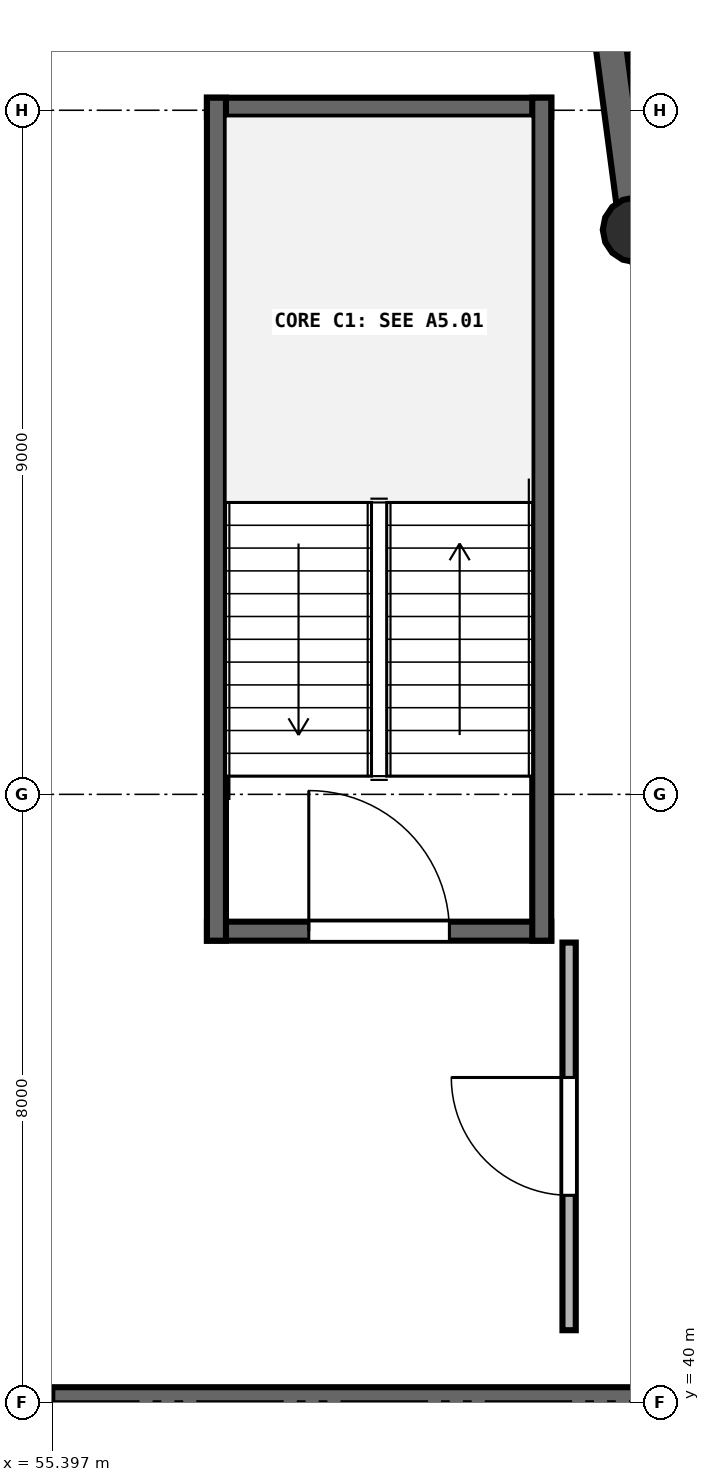
"""IFC4 building model, lengths in metres.
Left out: names, types, materials, properties, quantities, classifications, styles, units other than length and angle.
Written with IfcOpenShell. Run it as: python <this file> out.ifc"""

import sys

from ifc_helpers import new_model, si_unit, direction, frame, frame_2d, origin, origin_2d, place, context, subcontext, project, spatial, rectangle, circle, extrude, element, fill, save


model = new_model("IFC4")
c1 = context("Model", 3, precision=1e-05, world=origin(), true_north=direction((0.0, 1.0)))
c2 = subcontext(c1, "Body", "Model", "MODEL_VIEW")
j1 = project(units=[si_unit("LENGTHUNIT", "METRE"), si_unit("PLANEANGLEUNIT", "RADIAN")], contexts=[c1])
p1 = place(None, origin())
s1 = spatial("IfcSite", under=j1, at=p1, CompositionType="ELEMENT")
p2 = place(p1, origin())
s2 = spatial("IfcBuilding", under=s1, at=p2, CompositionType="ELEMENT")
p3 = place(p2, frame((0.0, 0.0, 19.2)))
s3 = spatial("IfcBuildingStorey", under=s2, at=p3, CompositionType="ELEMENT", Elevation=19.2)
p4 = place(p3, frame((63.068, 55.427, 0.0), z_axis=(0.0, 0.0, 1.0), x_axis=(1.0, 0.0, 0.0)))
e1 = element("IfcColumn", 1, at=p4, inside=s3, PredefinedType="COLUMN", context=c2, shape_type="SweptSolid", body=[
    extrude(circle(Radius=0.425, at=origin_2d()), origin(), (0.0, 0.0, 1.0), 4.25),
])
p5 = place(p3, frame((62.4, 60.5, 0.0), z_axis=(0.0, 0.0, 1.0), x_axis=(0.130591512704, -0.99143625958, 0.0)))
e2 = element("IfcWall", 2, at=p5, inside=s3, PredefinedType="SHEAR", context=c2, shape_type="SweptSolid", body=[
    extrude(rectangle(XDim=5.117, YDim=0.4, at=frame_2d((2.558, 0.0))), origin(), (0.0, 0.0, 1.0), 4.25),
])
p6 = place(p3, frame((63.068, 55.427, 0.0), z_axis=(0.0, 0.0, 1.0), x_axis=(0.382642581018, -0.923896452635, 0.0)))
e3 = element("IfcWall", 3, at=p6, inside=s3, PredefinedType="SHEAR", context=c2, shape_type="SweptSolid", body=[
    extrude(rectangle(XDim=5.116, YDim=0.4, at=frame_2d((2.558, 0.0))), origin(), (0.0, 0.0, 1.0), 4.25),
])
p7 = place(p3, frame((55.4, 40.0, 0.0), z_axis=(0.0, 0.0, 1.0), x_axis=(1.0, 0.0, 0.0)))
e4 = element("IfcWall", 4, at=p7, inside=s3, PredefinedType="SHEAR", context=c2, shape_type="SweptSolid", body=[
    extrude(rectangle(XDim=8.2, YDim=0.4, at=frame_2d((4.1, 0.0))), origin(), (0.0, 0.0, 1.0), 4.25),
])
p8 = place(p3, frame((57.435, 46.2, 0.0), z_axis=(0.0, 0.0, 1.0), x_axis=(1.0, 0.0, 0.0)))
e5 = element("IfcWall", 5, at=p8, inside=s3, PredefinedType="SHEAR", context=c2, shape_type="SweptSolid", body=[
    extrude(rectangle(XDim=4.53, YDim=0.25, at=frame_2d((2.265, 0.0))), origin(), (0.0, 0.0, 1.0), 4.25),
])
p9 = place(p8, frame((1.34, 0.0, 0.0)))
e6 = element("IfcOpeningElement", 6, at=p9, cuts=e5, PredefinedType="OPENING", context=c2, shape_type="SweptSolid", body=[
    extrude(rectangle(XDim=1.85, YDim=2.25, at=frame_2d((0.925, 1.125))), frame((0.0, 0.135, 0.0), z_axis=(0.0, -1.0, 0.0), x_axis=(1.0, 0.0, 0.0)), (0.0, 0.0, 1.0), 0.27),
])
p10 = place(p3, frame((57.435, 57.04, 0.0), z_axis=(0.0, 0.0, 1.0), x_axis=(1.0, 0.0, 0.0)))
e7 = element("IfcWall", 7, at=p10, inside=s3, PredefinedType="SHEAR", context=c2, shape_type="SweptSolid", body=[
    extrude(rectangle(XDim=4.53, YDim=0.25, at=frame_2d((2.265, 0.0))), origin(), (0.0, 0.0, 1.0), 4.25),
])
for number, where, z_axis, x_axis in (
    (8, (57.56, 46.075, 0.0), (0.0, 0.0, 1.0), (0.0, 1.0, 0.0)),
    (9, (61.84, 46.075, 0.0), (0.0, 0.0, 1.0), (0.0, 1.0, 0.0)),
):
    element("IfcWall", number, at=place(p3, frame(where, z_axis=z_axis, x_axis=x_axis)), inside=s3, PredefinedType="SHEAR", context=c2, shape_type="SweptSolid", body=[
        extrude(rectangle(XDim=11.09, YDim=0.25, at=frame_2d((5.545, 0.0))), origin(), (0.0, 0.0, 1.0), 4.25),
    ])
p11 = place(p3, frame((62.2, 40.95, 0.0), z_axis=(0.0, 0.0, 1.0), x_axis=(0.0, 1.0, 0.0)))
e10 = element("IfcWall", 10, at=p11, inside=s3, PredefinedType="PARTITIONING", context=c2, shape_type="SweptSolid", body=[
    extrude(rectangle(XDim=5.1, YDim=0.175, at=frame_2d((2.55, 0.0))), origin(), (0.0, 0.0, 1.0), 4.2),
])
p12 = place(p11, frame((1.775, 0.0, 0.0)))
e11 = element("IfcOpeningElement", 11, at=p12, cuts=e10, PredefinedType="OPENING", context=c2, shape_type="SweptSolid", body=[
    extrude(rectangle(XDim=1.55, YDim=2.22, at=frame_2d((0.775, 1.11))), frame((0.0, 0.097, 0.0), z_axis=(0.0, -1.0, 0.0), x_axis=(1.0, 0.0, 0.0)), (0.0, 0.0, 1.0), 0.195),
])
p13 = place(p9, origin())
e12 = element("IfcDoor", 12, at=p13, inside=s3, OperationType="SINGLE_SWING_LEFT", PredefinedType="DOOR", context=c2, shape_type="SweptSolid", body=[
    extrude(rectangle(XDim=1.85, YDim=2.25, at=frame_2d((0.925, 1.125))), frame((0.0, 0.025, 0.0), z_axis=(0.0, -1.0, 0.0), x_axis=(1.0, 0.0, 0.0)), (0.0, 0.0, 1.0), 0.05),
])
fill(e6, e12)
p14 = place(p12, origin())
e13 = element("IfcDoor", 13, at=p14, inside=s3, OperationType="SINGLE_SWING_RIGHT", PredefinedType="DOOR", context=c2, shape_type="SweptSolid", body=[
    extrude(rectangle(XDim=1.55, YDim=2.22, at=frame_2d((0.775, 1.11))), frame((0.0, 0.025, 0.0), z_axis=(0.0, -1.0, 0.0), x_axis=(1.0, 0.0, 0.0)), (0.0, 0.0, 1.0), 0.05),
])
fill(e11, e13)
save(model, sys.argv[1])
